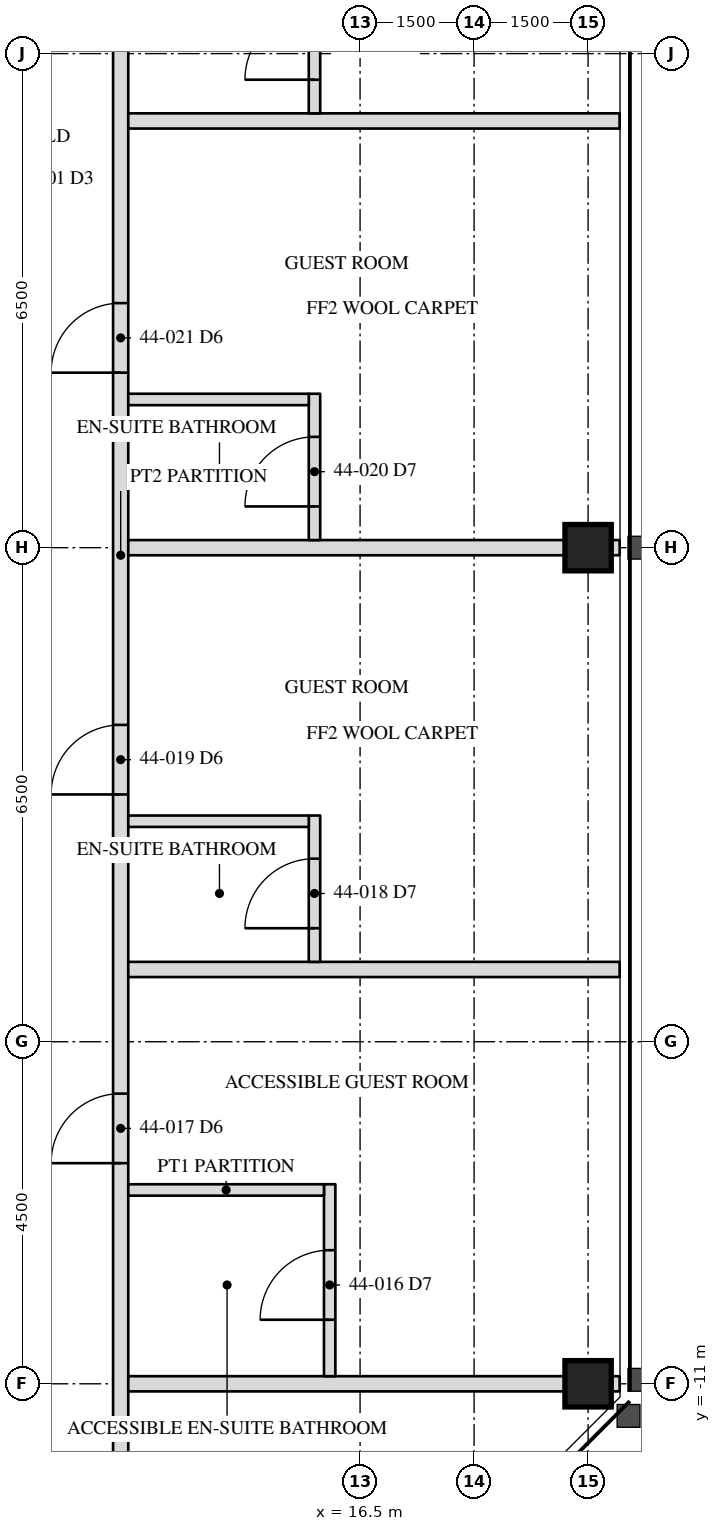
"""IFC4 building model, lengths in metres.
Left out: names, types, materials, properties, quantities, classifications, styles, units other than length and angle.
Written with IfcOpenShell. Run it as: python <this file> out.ifc"""

import sys

from ifc_helpers import new_model, si_unit, direction, frame, frame_2d, origin, origin_2d, place, context, subcontext, project, spatial, rectangle, hollow_rectangle, extrude, element, fill, save


model = new_model("IFC4")
c1 = context("Model", 3, precision=1e-05, world=origin(), true_north=direction((0.0, 1.0)))
c2 = subcontext(c1, "Body", "Model", "MODEL_VIEW")
j1 = project(units=[si_unit("LENGTHUNIT", "METRE"), si_unit("PLANEANGLEUNIT", "RADIAN")], contexts=[c1])
p1 = place(None, origin())
s1 = spatial("IfcSite", under=j1, at=p1, CompositionType="ELEMENT")
p2 = place(p1, origin())
s2 = spatial("IfcBuilding", under=s1, at=p2, CompositionType="ELEMENT")
p3 = place(p2, frame((0.0, 0.0, 190.7)))
s3 = spatial("IfcBuildingStorey", under=s2, at=p3, CompositionType="ELEMENT", Elevation=190.7)
for number, where, z_axis, x_axis in (
    (1, (19.5, -11.0, 0.0), (0.0, 0.0, 1.0), (0.0, 1.0, 0.0)),
    (2, (19.5, 0.0, 0.0), (0.0, 0.0, 1.0), (0.0, 1.0, 0.0)),
):
    element("IfcColumn", number, at=place(p3, frame(where, z_axis=z_axis, x_axis=x_axis)), inside=s3, PredefinedType="COLUMN", context=c2, shape_type="SweptSolid", body=[
        extrude(hollow_rectangle(XDim=0.61, YDim=0.61, WallThickness=0.076, at=origin_2d()), origin(), (0.0, 0.0, 1.0), 3.5),
    ])
p4 = place(p3, frame((13.35, -13.45, 0.0), z_axis=(0.0, 0.0, 1.0), x_axis=(0.0, 1.0, 0.0)))
e3 = element("IfcWall", 3, at=p4, inside=s3, PredefinedType="PARTITIONING", context=c2, shape_type="SweptSolid", body=[
    extrude(rectangle(XDim=26.7, YDim=0.2, at=frame_2d((13.35, 0.0))), origin(), (0.0, 0.0, 1.0), 3.31),
])
p5 = place(p4, frame((5.353, 0.0, 0.0)))
e4 = element("IfcOpeningElement", 4, at=p5, cuts=e3, PredefinedType="OPENING", context=c2, shape_type="SweptSolid", body=[
    extrude(rectangle(XDim=0.915, YDim=2.134, at=frame_2d((0.458, 1.067))), frame((0.0, 0.11, 0.0), z_axis=(0.0, -1.0, 0.0), x_axis=(1.0, 0.0, 0.0)), (0.0, 0.0, 1.0), 0.22),
])
p6 = place(p4, frame((10.204, 0.0, 0.0)))
e5 = element("IfcOpeningElement", 5, at=p6, cuts=e3, PredefinedType="OPENING", context=c2, shape_type="SweptSolid", body=[
    extrude(rectangle(XDim=0.915, YDim=2.134, at=frame_2d((0.458, 1.067))), frame((0.0, 0.11, 0.0), z_axis=(0.0, -1.0, 0.0), x_axis=(1.0, 0.0, 0.0)), (0.0, 0.0, 1.0), 0.22),
])
p7 = place(p4, frame((15.752, 0.0, 0.0)))
e6 = element("IfcOpeningElement", 6, at=p7, cuts=e3, PredefinedType="OPENING", context=c2, shape_type="SweptSolid", body=[
    extrude(rectangle(XDim=0.915, YDim=2.134, at=frame_2d((0.458, 1.067))), frame((0.0, 0.11, 0.0), z_axis=(0.0, -1.0, 0.0), x_axis=(1.0, 0.0, 0.0)), (0.0, 0.0, 1.0), 0.22),
])
p8 = place(p4, frame((21.366, 0.0, 0.0)))
e7 = element("IfcOpeningElement", 7, at=p8, cuts=e3, PredefinedType="OPENING", context=c2, shape_type="SweptSolid", body=[
    extrude(rectangle(XDim=0.915, YDim=2.134, at=frame_2d((0.458, 1.067))), frame((0.0, 0.11, 0.0), z_axis=(0.0, -1.0, 0.0), x_axis=(1.0, 0.0, 0.0)), (0.0, 0.0, 1.0), 0.22),
])
p9 = place(p3, frame((13.45, -11.0, 0.0), z_axis=(0.0, 0.0, 1.0), x_axis=(1.0, 0.0, 0.0)))
e8 = element("IfcWall", 8, at=p9, inside=s3, PredefinedType="PARTITIONING", context=c2, shape_type="SweptSolid", body=[
    extrude(rectangle(XDim=6.465, YDim=0.2, at=frame_2d((3.232, 0.0))), origin(), (0.0, 0.0, 1.0), 2.802),
])
p10 = place(p3, frame((13.45, -5.549, 0.0), z_axis=(0.0, 0.0, 1.0), x_axis=(1.0, 0.0, 0.0)))
e9 = element("IfcWall", 9, at=p10, inside=s3, PredefinedType="PARTITIONING", context=c2, shape_type="SweptSolid", body=[
    extrude(rectangle(XDim=6.465, YDim=0.2, at=frame_2d((3.232, 0.0))), origin(), (0.0, 0.0, 1.0), 3.31),
])
p11 = place(p3, frame((13.45, 0.0, 0.0), z_axis=(0.0, 0.0, 1.0), x_axis=(1.0, 0.0, 0.0)))
e10 = element("IfcWall", 10, at=p11, inside=s3, PredefinedType="PARTITIONING", context=c2, shape_type="SweptSolid", body=[
    extrude(rectangle(XDim=6.465, YDim=0.2, at=frame_2d((3.232, 0.0))), origin(), (0.0, 0.0, 1.0), 2.802),
])
p12 = place(p3, frame((13.45, 5.614, 0.0), z_axis=(0.0, 0.0, 1.0), x_axis=(1.0, 0.0, 0.0)))
e11 = element("IfcWall", 11, at=p12, inside=s3, PredefinedType="PARTITIONING", context=c2, shape_type="SweptSolid", body=[
    extrude(rectangle(XDim=6.465, YDim=0.2, at=frame_2d((3.232, 0.0))), origin(), (0.0, 0.0, 1.0), 3.31),
])
p13 = place(p3, frame((16.1, -10.9, 0.0), z_axis=(0.0, 0.0, 1.0), x_axis=(0.0, 1.0, 0.0)))
e12 = element("IfcWall", 12, at=p13, inside=s3, PredefinedType="PARTITIONING", context=c2, shape_type="SweptSolid", body=[
    extrude(rectangle(XDim=2.525, YDim=0.15, at=frame_2d((1.262, 0.0))), origin(), (0.0, 0.0, 1.0), 3.31),
])
p14 = place(p13, frame((0.742, 0.0, 0.0)))
e13 = element("IfcOpeningElement", 13, at=p14, cuts=e12, PredefinedType="OPENING", context=c2, shape_type="SweptSolid", body=[
    extrude(rectangle(XDim=0.915, YDim=2.032, at=frame_2d((0.458, 1.016))), frame((0.0, 0.085, 0.0), z_axis=(0.0, -1.0, 0.0), x_axis=(1.0, 0.0, 0.0)), (0.0, 0.0, 1.0), 0.17),
])
p15 = place(p3, frame((13.45, -8.45, 0.0), z_axis=(0.0, 0.0, 1.0), x_axis=(1.0, 0.0, 0.0)))
e14 = element("IfcWall", 14, at=p15, inside=s3, PredefinedType="PARTITIONING", context=c2, shape_type="SweptSolid", body=[
    extrude(rectangle(XDim=2.575, YDim=0.15, at=frame_2d((1.288, 0.0))), origin(), (0.0, 0.0, 1.0), 3.31),
])
p16 = place(p3, frame((15.9, -5.449, 0.0), z_axis=(0.0, 0.0, 1.0), x_axis=(0.0, 1.0, 0.0)))
e15 = element("IfcWall", 15, at=p16, inside=s3, PredefinedType="PARTITIONING", context=c2, shape_type="SweptSolid", body=[
    extrude(rectangle(XDim=1.925, YDim=0.15, at=frame_2d((0.962, 0.0))), origin(), (0.0, 0.0, 1.0), 3.31),
])
p17 = place(p16, frame((0.442, 0.0, 0.0)))
e16 = element("IfcOpeningElement", 16, at=p17, cuts=e15, PredefinedType="OPENING", context=c2, shape_type="SweptSolid", body=[
    extrude(rectangle(XDim=0.915, YDim=2.032, at=frame_2d((0.458, 1.016))), frame((0.0, 0.085, 0.0), z_axis=(0.0, -1.0, 0.0), x_axis=(1.0, 0.0, 0.0)), (0.0, 0.0, 1.0), 0.17),
])
p18 = place(p3, frame((13.45, -3.599, 0.0), z_axis=(0.0, 0.0, 1.0), x_axis=(1.0, 0.0, 0.0)))
e17 = element("IfcWall", 17, at=p18, inside=s3, PredefinedType="PARTITIONING", context=c2, shape_type="SweptSolid", body=[
    extrude(rectangle(XDim=2.375, YDim=0.15, at=frame_2d((1.188, 0.0))), origin(), (0.0, 0.0, 1.0), 2.703),
])
p19 = place(p3, frame((15.9, 0.1, 0.0), z_axis=(0.0, 0.0, 1.0), x_axis=(0.0, 1.0, 0.0)))
e18 = element("IfcWall", 18, at=p19, inside=s3, PredefinedType="PARTITIONING", context=c2, shape_type="SweptSolid", body=[
    extrude(rectangle(XDim=1.925, YDim=0.15, at=frame_2d((0.962, 0.0))), origin(), (0.0, 0.0, 1.0), 3.31),
])
p20 = place(p19, frame((0.442, 0.0, 0.0)))
e19 = element("IfcOpeningElement", 19, at=p20, cuts=e18, PredefinedType="OPENING", context=c2, shape_type="SweptSolid", body=[
    extrude(rectangle(XDim=0.915, YDim=2.032, at=frame_2d((0.458, 1.016))), frame((0.0, 0.085, 0.0), z_axis=(0.0, -1.0, 0.0), x_axis=(1.0, 0.0, 0.0)), (0.0, 0.0, 1.0), 0.17),
])
p21 = place(p3, frame((13.45, 1.95, 0.0), z_axis=(0.0, 0.0, 1.0), x_axis=(1.0, 0.0, 0.0)))
e20 = element("IfcWall", 20, at=p21, inside=s3, PredefinedType="PARTITIONING", context=c2, shape_type="SweptSolid", body=[
    extrude(rectangle(XDim=2.375, YDim=0.15, at=frame_2d((1.188, 0.0))), origin(), (0.0, 0.0, 1.0), 3.31),
])
p22 = place(p3, frame((15.9, 5.714, 0.0), z_axis=(0.0, 0.0, 1.0), x_axis=(0.0, 1.0, 0.0)))
e21 = element("IfcWall", 21, at=p22, inside=s3, PredefinedType="PARTITIONING", context=c2, shape_type="SweptSolid", body=[
    extrude(rectangle(XDim=1.925, YDim=0.15, at=frame_2d((0.962, 0.0))), origin(), (0.0, 0.0, 1.0), 3.31),
])
p23 = place(p22, frame((0.442, 0.0, 0.0)))
e22 = element("IfcOpeningElement", 22, at=p23, cuts=e21, PredefinedType="OPENING", context=c2, shape_type="SweptSolid", body=[
    extrude(rectangle(XDim=0.915, YDim=2.032, at=frame_2d((0.458, 1.016))), frame((0.0, 0.085, 0.0), z_axis=(0.0, -1.0, 0.0), x_axis=(1.0, 0.0, 0.0)), (0.0, 0.0, 1.0), 0.17),
])
p24 = place(p14, origin())
e23 = element("IfcDoor", 23, at=p24, inside=s3, OperationType="SINGLE_SWING_LEFT", PredefinedType="DOOR", context=c2, shape_type="SweptSolid", body=[
    extrude(rectangle(XDim=0.915, YDim=2.032, at=frame_2d((0.458, 1.016))), frame((0.0, 0.025, 0.0), z_axis=(0.0, -1.0, 0.0), x_axis=(1.0, 0.0, 0.0)), (0.0, 0.0, 1.0), 0.05),
])
fill(e13, e23)
p25 = place(p5, origin())
e24 = element("IfcDoor", 24, at=p25, inside=s3, OperationType="SINGLE_SWING_LEFT", PredefinedType="DOOR", context=c2, shape_type="SweptSolid", body=[
    extrude(rectangle(XDim=0.915, YDim=2.134, at=frame_2d((0.458, 1.067))), frame((0.0, 0.025, 0.0), z_axis=(0.0, -1.0, 0.0), x_axis=(1.0, 0.0, 0.0)), (0.0, 0.0, 1.0), 0.05),
])
fill(e4, e24)
p26 = place(p17, origin())
e25 = element("IfcDoor", 25, at=p26, inside=s3, OperationType="SINGLE_SWING_LEFT", PredefinedType="DOOR", context=c2, shape_type="SweptSolid", body=[
    extrude(rectangle(XDim=0.915, YDim=2.032, at=frame_2d((0.458, 1.016))), frame((0.0, 0.025, 0.0), z_axis=(0.0, -1.0, 0.0), x_axis=(1.0, 0.0, 0.0)), (0.0, 0.0, 1.0), 0.05),
])
fill(e16, e25)
p27 = place(p6, origin())
e26 = element("IfcDoor", 26, at=p27, inside=s3, OperationType="SINGLE_SWING_LEFT", PredefinedType="DOOR", context=c2, shape_type="SweptSolid", body=[
    extrude(rectangle(XDim=0.915, YDim=2.134, at=frame_2d((0.458, 1.067))), frame((0.0, 0.025, 0.0), z_axis=(0.0, -1.0, 0.0), x_axis=(1.0, 0.0, 0.0)), (0.0, 0.0, 1.0), 0.05),
])
fill(e5, e26)
p28 = place(p20, origin())
e27 = element("IfcDoor", 27, at=p28, inside=s3, OperationType="SINGLE_SWING_LEFT", PredefinedType="DOOR", context=c2, shape_type="SweptSolid", body=[
    extrude(rectangle(XDim=0.915, YDim=2.032, at=frame_2d((0.458, 1.016))), frame((0.0, 0.025, 0.0), z_axis=(0.0, -1.0, 0.0), x_axis=(1.0, 0.0, 0.0)), (0.0, 0.0, 1.0), 0.05),
])
fill(e19, e27)
p29 = place(p7, origin())
e28 = element("IfcDoor", 28, at=p29, inside=s3, OperationType="SINGLE_SWING_LEFT", PredefinedType="DOOR", context=c2, shape_type="SweptSolid", body=[
    extrude(rectangle(XDim=0.915, YDim=2.134, at=frame_2d((0.458, 1.067))), frame((0.0, 0.025, 0.0), z_axis=(0.0, -1.0, 0.0), x_axis=(1.0, 0.0, 0.0)), (0.0, 0.0, 1.0), 0.05),
])
fill(e6, e28)
p30 = place(p23, origin())
e29 = element("IfcDoor", 29, at=p30, inside=s3, OperationType="SINGLE_SWING_LEFT", PredefinedType="DOOR", context=c2, shape_type="SweptSolid", body=[
    extrude(rectangle(XDim=0.915, YDim=2.032, at=frame_2d((0.458, 1.016))), frame((0.0, 0.025, 0.0), z_axis=(0.0, -1.0, 0.0), x_axis=(1.0, 0.0, 0.0)), (0.0, 0.0, 1.0), 0.05),
])
fill(e22, e29)
save(model, sys.argv[1])
